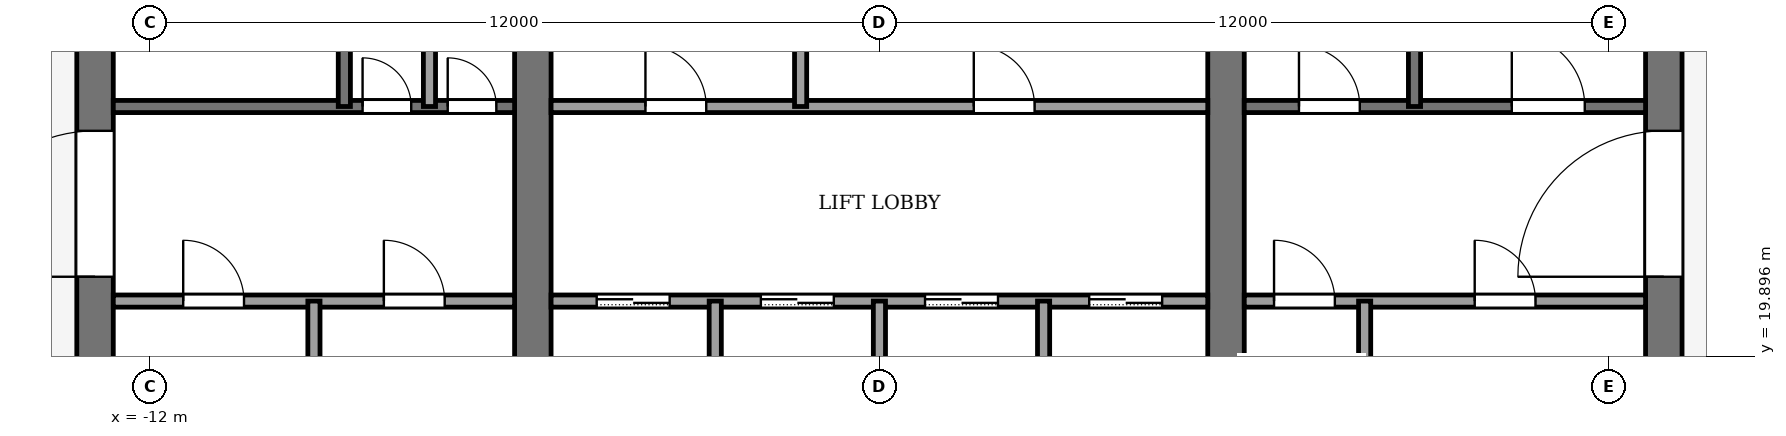
"""IFC4 building model, lengths in metres.
Left out: names, types, materials, properties, quantities, classifications, styles, units other than length and angle.
Written with IfcOpenShell. Run it as: python <this file> out.ifc"""

import sys

from ifc_helpers import new_model, si_unit, direction, frame, frame_2d, origin, place, context, subcontext, project, spatial, rectangle, extrude, element, fill, save


model = new_model("IFC4")
c1 = context("Model", 3, precision=1e-05, world=origin(), true_north=direction((0.0, 1.0)))
c2 = subcontext(c1, "Body", "Model", "MODEL_VIEW")
j1 = project(units=[si_unit("LENGTHUNIT", "METRE"), si_unit("PLANEANGLEUNIT", "RADIAN")], contexts=[c1])
p1 = place(None, origin())
s1 = spatial("IfcSite", under=j1, at=p1, CompositionType="ELEMENT")
p2 = place(p1, origin())
s2 = spatial("IfcBuilding", under=s1, at=p2, CompositionType="ELEMENT")
p3 = place(p2, frame((0.0, 0.0, 314.0)))
s3 = spatial("IfcBuildingStorey", under=s2, at=p3, CompositionType="ELEMENT", Elevation=314.0)
p4 = place(p3, frame((-12.9, 18.4, -0.13), z_axis=(0.0, 0.0, 1.0), x_axis=(0.0, 1.0, 0.0)))
e1 = element("IfcWall", 1, at=p4, inside=s3, PredefinedType="SHEAR", context=c2, shape_type="SweptSolid", body=[
    extrude(rectangle(XDim=19.2, YDim=0.6, at=frame_2d((9.6, 0.0))), origin(), (0.0, 0.0, 1.0), 4.0),
])
p5 = place(p4, frame((2.8, 0.0, 0.13)))
e2 = element("IfcOpeningElement", 2, at=p5, cuts=e1, PredefinedType="OPENING", context=c2, shape_type="SweptSolid", body=[
    extrude(rectangle(XDim=2.4, YDim=2.4, at=frame_2d((1.2, 1.2))), frame((0.0, 0.31, 0.0), z_axis=(0.0, -1.0, 0.0), x_axis=(1.0, 0.0, 0.0)), (0.0, 0.0, 1.0), 0.62),
])
p6 = place(p4, frame((13.4, 0.0, 0.13)))
e3 = element("IfcOpeningElement", 3, at=p6, cuts=e1, PredefinedType="OPENING", context=c2, shape_type="SweptSolid", body=[
    extrude(rectangle(XDim=1.4, YDim=2.2, at=frame_2d((0.7, 1.1))), frame((0.0, 0.31, 0.0), z_axis=(0.0, -1.0, 0.0), x_axis=(1.0, 0.0, 0.0)), (0.0, 0.0, 1.0), 0.62),
])
p7 = place(p3, frame((12.9, 18.4, -0.13), z_axis=(0.0, 0.0, 1.0), x_axis=(0.0, 1.0, 0.0)))
e4 = element("IfcWall", 4, at=p7, inside=s3, PredefinedType="SHEAR", context=c2, shape_type="SweptSolid", body=[
    extrude(rectangle(XDim=19.2, YDim=0.6, at=frame_2d((9.6, 0.0))), origin(), (0.0, 0.0, 1.0), 4.0),
])
p8 = place(p7, frame((2.8, 0.0, 0.13)))
e5 = element("IfcOpeningElement", 5, at=p8, cuts=e4, PredefinedType="OPENING", context=c2, shape_type="SweptSolid", body=[
    extrude(rectangle(XDim=2.4, YDim=2.4, at=frame_2d((1.2, 1.2))), frame((0.0, 0.31, 0.0), z_axis=(0.0, -1.0, 0.0), x_axis=(1.0, 0.0, 0.0)), (0.0, 0.0, 1.0), 0.62),
])
p9 = place(p7, frame((13.3, 0.0, 0.13)))
e6 = element("IfcOpeningElement", 6, at=p9, cuts=e4, PredefinedType="OPENING", context=c2, shape_type="SweptSolid", body=[
    extrude(rectangle(XDim=2.4, YDim=2.4, at=frame_2d((1.2, 1.2))), frame((0.0, 0.31, 0.0), z_axis=(0.0, -1.0, 0.0), x_axis=(1.0, 0.0, 0.0)), (0.0, 0.0, 1.0), 0.62),
])
p10 = place(p3, frame((-5.7, 18.4, -0.13), z_axis=(0.0, 0.0, 1.0), x_axis=(0.0, 1.0, 0.0)))
e7 = element("IfcWall", 7, at=p10, inside=s3, PredefinedType="SHEAR", context=c2, shape_type="SweptSolid", body=[
    extrude(rectangle(XDim=19.2, YDim=0.6, at=frame_2d((9.6, 0.0))), origin(), (0.0, 0.0, 1.0), 4.0),
])
p11 = place(p10, frame((8.35, 0.0, 0.13)))
e8 = element("IfcOpeningElement", 8, at=p11, cuts=e7, PredefinedType="OPENING", context=c2, shape_type="SweptSolid", body=[
    extrude(rectangle(XDim=0.9, YDim=2.1, at=frame_2d((0.45, 1.05))), frame((0.0, 0.31, 0.0), z_axis=(0.0, -1.0, 0.0), x_axis=(1.0, 0.0, 0.0)), (0.0, 0.0, 1.0), 0.62),
])
p12 = place(p3, frame((5.7, 18.4, -0.13), z_axis=(0.0, 0.0, 1.0), x_axis=(0.0, 1.0, 0.0)))
e9 = element("IfcWall", 9, at=p12, inside=s3, PredefinedType="SHEAR", context=c2, shape_type="SweptSolid", body=[
    extrude(rectangle(XDim=19.2, YDim=0.6, at=frame_2d((9.6, 0.0))), origin(), (0.0, 0.0, 1.0), 4.0),
])
p13 = place(p12, frame((8.35, 0.0, 0.13)))
e10 = element("IfcOpeningElement", 10, at=p13, cuts=e9, PredefinedType="OPENING", context=c2, shape_type="SweptSolid", body=[
    extrude(rectangle(XDim=0.9, YDim=2.1, at=frame_2d((0.45, 1.05))), frame((0.0, 0.31, 0.0), z_axis=(0.0, -1.0, 0.0), x_axis=(1.0, 0.0, 0.0)), (0.0, 0.0, 1.0), 0.62),
])
p14 = place(p12, frame((13.3, 0.0, 0.13)))
e11 = element("IfcOpeningElement", 11, at=p14, cuts=e9, PredefinedType="OPENING", context=c2, shape_type="SweptSolid", body=[
    extrude(rectangle(XDim=2.4, YDim=2.4, at=frame_2d((1.2, 1.2))), frame((0.0, 0.31, 0.0), z_axis=(0.0, -1.0, 0.0), x_axis=(1.0, 0.0, 0.0)), (0.0, 0.0, 1.0), 0.62),
])
p15 = place(p3, frame((-12.6, 20.8, 0.0), z_axis=(0.0, 0.0, 1.0), x_axis=(1.0, 0.0, 0.0)))
e12 = element("IfcWall", 12, at=p15, inside=s3, PredefinedType="PARTITIONING", context=c2, shape_type="SweptSolid", body=[
    extrude(rectangle(XDim=6.6, YDim=0.2, at=frame_2d((3.3, 0.0))), origin(), (0.0, 0.0, 1.0), 3.87),
])
p16 = place(p15, frame((1.15, 0.0, 0.0)))
e13 = element("IfcOpeningElement", 13, at=p16, cuts=e12, PredefinedType="OPENING", context=c2, shape_type="SweptSolid", body=[
    extrude(rectangle(XDim=1.0, YDim=2.1, at=frame_2d((0.5, 1.05))), frame((0.0, 0.11, 0.0), z_axis=(0.0, -1.0, 0.0), x_axis=(1.0, 0.0, 0.0)), (0.0, 0.0, 1.0), 0.22),
])
p17 = place(p15, frame((4.45, 0.0, 0.0)))
e14 = element("IfcOpeningElement", 14, at=p17, cuts=e12, PredefinedType="OPENING", context=c2, shape_type="SweptSolid", body=[
    extrude(rectangle(XDim=1.0, YDim=2.1, at=frame_2d((0.5, 1.05))), frame((0.0, 0.11, 0.0), z_axis=(0.0, -1.0, 0.0), x_axis=(1.0, 0.0, 0.0)), (0.0, 0.0, 1.0), 0.22),
])
p18 = place(p3, frame((-5.4, 20.8, 0.0), z_axis=(0.0, 0.0, 1.0), x_axis=(1.0, 0.0, 0.0)))
e15 = element("IfcWall", 15, at=p18, inside=s3, PredefinedType="PARTITIONING", context=c2, shape_type="SweptSolid", body=[
    extrude(rectangle(XDim=10.8, YDim=0.2, at=frame_2d((5.4, 0.0))), origin(), (0.0, 0.0, 1.0), 3.87),
])
p19 = place(p18, frame((0.75, 0.0, 0.0)))
e16 = element("IfcOpeningElement", 16, at=p19, cuts=e15, PredefinedType="OPENING", context=c2, shape_type="SweptSolid", body=[
    extrude(rectangle(XDim=1.2, YDim=2.2, at=frame_2d((0.6, 1.1))), frame((0.0, 0.11, 0.0), z_axis=(0.0, -1.0, 0.0), x_axis=(1.0, 0.0, 0.0)), (0.0, 0.0, 1.0), 0.22),
])
p20 = place(p18, frame((3.45, 0.0, 0.0)))
e17 = element("IfcOpeningElement", 17, at=p20, cuts=e15, PredefinedType="OPENING", context=c2, shape_type="SweptSolid", body=[
    extrude(rectangle(XDim=1.2, YDim=2.2, at=frame_2d((0.6, 1.1))), frame((0.0, 0.11, 0.0), z_axis=(0.0, -1.0, 0.0), x_axis=(1.0, 0.0, 0.0)), (0.0, 0.0, 1.0), 0.22),
])
p21 = place(p18, frame((6.15, 0.0, 0.0)))
e18 = element("IfcOpeningElement", 18, at=p21, cuts=e15, PredefinedType="OPENING", context=c2, shape_type="SweptSolid", body=[
    extrude(rectangle(XDim=1.2, YDim=2.2, at=frame_2d((0.6, 1.1))), frame((0.0, 0.11, 0.0), z_axis=(0.0, -1.0, 0.0), x_axis=(1.0, 0.0, 0.0)), (0.0, 0.0, 1.0), 0.22),
])
p22 = place(p18, frame((8.85, 0.0, 0.0)))
e19 = element("IfcOpeningElement", 19, at=p22, cuts=e15, PredefinedType="OPENING", context=c2, shape_type="SweptSolid", body=[
    extrude(rectangle(XDim=1.2, YDim=2.2, at=frame_2d((0.6, 1.1))), frame((0.0, 0.11, 0.0), z_axis=(0.0, -1.0, 0.0), x_axis=(1.0, 0.0, 0.0)), (0.0, 0.0, 1.0), 0.22),
])
p23 = place(p3, frame((6.0, 20.8, 0.0), z_axis=(0.0, 0.0, 1.0), x_axis=(1.0, 0.0, 0.0)))
e20 = element("IfcWall", 20, at=p23, inside=s3, PredefinedType="PARTITIONING", context=c2, shape_type="SweptSolid", body=[
    extrude(rectangle(XDim=6.6, YDim=0.2, at=frame_2d((3.3, 0.0))), origin(), (0.0, 0.0, 1.0), 3.87),
])
p24 = place(p23, frame((0.49, 0.0, 0.0)))
e21 = element("IfcOpeningElement", 21, at=p24, cuts=e20, PredefinedType="OPENING", context=c2, shape_type="SweptSolid", body=[
    extrude(rectangle(XDim=1.0, YDim=2.1, at=frame_2d((0.5, 1.05))), frame((0.0, 0.11, 0.0), z_axis=(0.0, -1.0, 0.0), x_axis=(1.0, 0.0, 0.0)), (0.0, 0.0, 1.0), 0.22),
])
p25 = place(p23, frame((3.79, 0.0, 0.0)))
e22 = element("IfcOpeningElement", 22, at=p25, cuts=e20, PredefinedType="OPENING", context=c2, shape_type="SweptSolid", body=[
    extrude(rectangle(XDim=1.0, YDim=2.1, at=frame_2d((0.5, 1.05))), frame((0.0, 0.11, 0.0), z_axis=(0.0, -1.0, 0.0), x_axis=(1.0, 0.0, 0.0)), (0.0, 0.0, 1.0), 0.22),
])
p26 = place(p3, frame((-12.6, 24.0, 0.0), z_axis=(0.0, 0.0, 1.0), x_axis=(1.0, 0.0, 0.0)))
e23 = element("IfcWall", 23, at=p26, inside=s3, PredefinedType="PARTITIONING", context=c2, shape_type="SweptSolid", body=[
    extrude(rectangle(XDim=6.6, YDim=0.2, at=frame_2d((3.3, 0.0))), origin(), (0.0, 0.0, 1.0), 3.87),
])
p27 = place(p26, frame((4.1, 0.0, 0.0)))
e24 = element("IfcOpeningElement", 24, at=p27, cuts=e23, PredefinedType="OPENING", context=c2, shape_type="SweptSolid", body=[
    extrude(rectangle(XDim=0.8, YDim=2.1, at=frame_2d((0.4, 1.05))), frame((0.0, 0.11, 0.0), z_axis=(0.0, -1.0, 0.0), x_axis=(1.0, 0.0, 0.0)), (0.0, 0.0, 1.0), 0.22),
])
p28 = place(p26, frame((5.5, 0.0, 0.0)))
e25 = element("IfcOpeningElement", 25, at=p28, cuts=e23, PredefinedType="OPENING", context=c2, shape_type="SweptSolid", body=[
    extrude(rectangle(XDim=0.8, YDim=2.1, at=frame_2d((0.4, 1.05))), frame((0.0, 0.11, 0.0), z_axis=(0.0, -1.0, 0.0), x_axis=(1.0, 0.0, 0.0)), (0.0, 0.0, 1.0), 0.22),
])
p29 = place(p3, frame((-5.4, 24.0, 0.0), z_axis=(0.0, 0.0, 1.0), x_axis=(1.0, 0.0, 0.0)))
e26 = element("IfcWall", 26, at=p29, inside=s3, PredefinedType="PARTITIONING", context=c2, shape_type="SweptSolid", body=[
    extrude(rectangle(XDim=10.8, YDim=0.2, at=frame_2d((5.4, 0.0))), origin(), (0.0, 0.0, 1.0), 3.87),
])
p30 = place(p29, frame((1.552, 0.0, 0.0)))
e27 = element("IfcOpeningElement", 27, at=p30, cuts=e26, PredefinedType="OPENING", context=c2, shape_type="SweptSolid", body=[
    extrude(rectangle(XDim=1.0, YDim=2.1, at=frame_2d((0.5, 1.05))), frame((0.0, 0.11, 0.0), z_axis=(0.0, -1.0, 0.0), x_axis=(1.0, 0.0, 0.0)), (0.0, 0.0, 1.0), 0.22),
])
p31 = place(p29, frame((6.952, 0.0, 0.0)))
e28 = element("IfcOpeningElement", 28, at=p31, cuts=e26, PredefinedType="OPENING", context=c2, shape_type="SweptSolid", body=[
    extrude(rectangle(XDim=1.0, YDim=2.1, at=frame_2d((0.5, 1.05))), frame((0.0, 0.11, 0.0), z_axis=(0.0, -1.0, 0.0), x_axis=(1.0, 0.0, 0.0)), (0.0, 0.0, 1.0), 0.22),
])
p32 = place(p3, frame((6.0, 24.0, 0.0), z_axis=(0.0, 0.0, 1.0), x_axis=(1.0, 0.0, 0.0)))
e29 = element("IfcWall", 29, at=p32, inside=s3, PredefinedType="PARTITIONING", context=c2, shape_type="SweptSolid", body=[
    extrude(rectangle(XDim=6.6, YDim=0.2, at=frame_2d((3.3, 0.0))), origin(), (0.0, 0.0, 1.0), 3.87),
])
p33 = place(p32, frame((0.9, 0.0, 0.0)))
e30 = element("IfcOpeningElement", 30, at=p33, cuts=e29, PredefinedType="OPENING", context=c2, shape_type="SweptSolid", body=[
    extrude(rectangle(XDim=1.0, YDim=2.1, at=frame_2d((0.5, 1.05))), frame((0.0, 0.11, 0.0), z_axis=(0.0, -1.0, 0.0), x_axis=(1.0, 0.0, 0.0)), (0.0, 0.0, 1.0), 0.22),
])
p34 = place(p32, frame((4.4, 0.0, 0.0)))
e31 = element("IfcOpeningElement", 31, at=p34, cuts=e29, PredefinedType="OPENING", context=c2, shape_type="SweptSolid", body=[
    extrude(rectangle(XDim=1.2, YDim=2.2, at=frame_2d((0.6, 1.1))), frame((0.0, 0.11, 0.0), z_axis=(0.0, -1.0, 0.0), x_axis=(1.0, 0.0, 0.0)), (0.0, 0.0, 1.0), 0.22),
])
p35 = place(p3, frame((-9.3, 18.4, 0.0), z_axis=(0.0, 0.0, 1.0), x_axis=(0.0, 1.0, 0.0)))
e32 = element("IfcWall", 32, at=p35, inside=s3, PredefinedType="PARTITIONING", context=c2, shape_type="SweptSolid", body=[
    extrude(rectangle(XDim=2.4, YDim=0.2, at=frame_2d((1.2, 0.0))), origin(), (0.0, 0.0, 1.0), 3.87),
])
for number, where, z_axis, x_axis in (
    (33, (-8.8, 24.0, 0.0), (0.0, 0.0, 1.0), (0.0, 1.0, 0.0)),
    (34, (-7.4, 24.0, 0.0), (0.0, 0.0, 1.0), (0.0, 1.0, 0.0)),
):
    element("IfcWall", number, at=place(p3, frame(where, z_axis=z_axis, x_axis=x_axis)), inside=s3, PredefinedType="PARTITIONING", context=c2, shape_type="SweptSolid", body=[
        extrude(rectangle(XDim=7.4, YDim=0.2, at=frame_2d((3.7, 0.0))), origin(), (0.0, 0.0, 1.0), 3.87),
    ])
p36 = place(p3, frame((-2.7, 18.4, 0.0), z_axis=(0.0, 0.0, 1.0), x_axis=(0.0, 1.0, 0.0)))
e35 = element("IfcWall", 35, at=p36, inside=s3, PredefinedType="PARTITIONING", context=c2, shape_type="SweptSolid", body=[
    extrude(rectangle(XDim=2.4, YDim=0.2, at=frame_2d((1.2, 0.0))), origin(), (0.0, 0.0, 1.0), 3.87),
])
p37 = place(p3, frame((-1.296, 24.0, 0.0), z_axis=(0.0, 0.0, 1.0), x_axis=(0.0, 1.0, 0.0)))
e36 = element("IfcWall", 36, at=p37, inside=s3, PredefinedType="PARTITIONING", context=c2, shape_type="SweptSolid", body=[
    extrude(rectangle(XDim=2.4, YDim=0.2, at=frame_2d((1.2, 0.0))), origin(), (0.0, 0.0, 1.0), 3.87),
])
for number, where, z_axis, x_axis in (
    (37, (0.0, 18.4, 0.0), (0.0, 0.0, 1.0), (0.0, 1.0, 0.0)),
    (38, (2.7, 18.4, 0.0), (0.0, 0.0, 1.0), (0.0, 1.0, 0.0)),
    (39, (7.98, 18.4, 0.0), (0.0, 0.0, 1.0), (0.0, 1.0, 0.0)),
):
    element("IfcWall", number, at=place(p3, frame(where, z_axis=z_axis, x_axis=x_axis)), inside=s3, PredefinedType="PARTITIONING", context=c2, shape_type="SweptSolid", body=[
        extrude(rectangle(XDim=2.4, YDim=0.2, at=frame_2d((1.2, 0.0))), origin(), (0.0, 0.0, 1.0), 3.87),
    ])
p38 = place(p3, frame((8.8, 24.0, 0.0), z_axis=(0.0, 0.0, 1.0), x_axis=(0.0, 1.0, 0.0)))
e40 = element("IfcWall", 40, at=p38, inside=s3, PredefinedType="PARTITIONING", context=c2, shape_type="SweptSolid", body=[
    extrude(rectangle(XDim=7.4, YDim=0.2, at=frame_2d((3.7, 0.0))), origin(), (0.0, 0.0, 1.0), 3.87),
])
p39 = place(p19, origin())
e41 = element("IfcDoor", 41, at=p39, inside=s3, OperationType="SLIDING_TO_LEFT", PredefinedType="DOOR", context=c2, shape_type="SweptSolid", body=[
    extrude(rectangle(XDim=1.2, YDim=2.2, at=frame_2d((0.6, 1.1))), frame((0.0, 0.025, 0.0), z_axis=(0.0, -1.0, 0.0), x_axis=(1.0, 0.0, 0.0)), (0.0, 0.0, 1.0), 0.05),
])
fill(e16, e41)
p40 = place(p20, origin())
e42 = element("IfcDoor", 42, at=p40, inside=s3, OperationType="SLIDING_TO_LEFT", PredefinedType="DOOR", context=c2, shape_type="SweptSolid", body=[
    extrude(rectangle(XDim=1.2, YDim=2.2, at=frame_2d((0.6, 1.1))), frame((0.0, 0.025, 0.0), z_axis=(0.0, -1.0, 0.0), x_axis=(1.0, 0.0, 0.0)), (0.0, 0.0, 1.0), 0.05),
])
fill(e17, e42)
p41 = place(p21, origin())
e43 = element("IfcDoor", 43, at=p41, inside=s3, OperationType="SLIDING_TO_LEFT", PredefinedType="DOOR", context=c2, shape_type="SweptSolid", body=[
    extrude(rectangle(XDim=1.2, YDim=2.2, at=frame_2d((0.6, 1.1))), frame((0.0, 0.025, 0.0), z_axis=(0.0, -1.0, 0.0), x_axis=(1.0, 0.0, 0.0)), (0.0, 0.0, 1.0), 0.05),
])
fill(e18, e43)
p42 = place(p22, origin())
e44 = element("IfcDoor", 44, at=p42, inside=s3, OperationType="SLIDING_TO_LEFT", PredefinedType="DOOR", context=c2, shape_type="SweptSolid", body=[
    extrude(rectangle(XDim=1.2, YDim=2.2, at=frame_2d((0.6, 1.1))), frame((0.0, 0.025, 0.0), z_axis=(0.0, -1.0, 0.0), x_axis=(1.0, 0.0, 0.0)), (0.0, 0.0, 1.0), 0.05),
])
fill(e19, e44)
p43 = place(p30, origin())
e45 = element("IfcDoor", 45, at=p43, inside=s3, OperationType="SINGLE_SWING_LEFT", PredefinedType="DOOR", context=c2, shape_type="SweptSolid", body=[
    extrude(rectangle(XDim=1.0, YDim=2.1, at=frame_2d((0.5, 1.05))), frame((0.0, 0.025, 0.0), z_axis=(0.0, -1.0, 0.0), x_axis=(1.0, 0.0, 0.0)), (0.0, 0.0, 1.0), 0.05),
])
fill(e27, e45)
p44 = place(p31, origin())
e46 = element("IfcDoor", 46, at=p44, inside=s3, OperationType="SINGLE_SWING_RIGHT", PredefinedType="DOOR", context=c2, shape_type="SweptSolid", body=[
    extrude(rectangle(XDim=1.0, YDim=2.1, at=frame_2d((0.5, 1.05))), frame((0.0, 0.025, 0.0), z_axis=(0.0, -1.0, 0.0), x_axis=(1.0, 0.0, 0.0)), (0.0, 0.0, 1.0), 0.05),
])
fill(e28, e46)
p45 = place(p16, origin())
e47 = element("IfcDoor", 47, at=p45, inside=s3, OperationType="SINGLE_SWING_LEFT", PredefinedType="DOOR", context=c2, shape_type="SweptSolid", body=[
    extrude(rectangle(XDim=1.0, YDim=2.1, at=frame_2d((0.5, 1.05))), frame((0.0, 0.025, 0.0), z_axis=(0.0, -1.0, 0.0), x_axis=(1.0, 0.0, 0.0)), (0.0, 0.0, 1.0), 0.05),
])
fill(e13, e47)
p46 = place(p17, origin())
e48 = element("IfcDoor", 48, at=p46, inside=s3, OperationType="SINGLE_SWING_LEFT", PredefinedType="DOOR", context=c2, shape_type="SweptSolid", body=[
    extrude(rectangle(XDim=1.0, YDim=2.1, at=frame_2d((0.5, 1.05))), frame((0.0, 0.025, 0.0), z_axis=(0.0, -1.0, 0.0), x_axis=(1.0, 0.0, 0.0)), (0.0, 0.0, 1.0), 0.05),
])
fill(e14, e48)
p47 = place(p24, origin())
e49 = element("IfcDoor", 49, at=p47, inside=s3, OperationType="SINGLE_SWING_RIGHT", PredefinedType="DOOR", context=c2, shape_type="SweptSolid", body=[
    extrude(rectangle(XDim=1.0, YDim=2.1, at=frame_2d((0.5, 1.05))), frame((0.0, 0.025, 0.0), z_axis=(0.0, -1.0, 0.0), x_axis=(1.0, 0.0, 0.0)), (0.0, 0.0, 1.0), 0.05),
])
fill(e21, e49)
p48 = place(p25, origin())
e50 = element("IfcDoor", 50, at=p48, inside=s3, OperationType="SINGLE_SWING_RIGHT", PredefinedType="DOOR", context=c2, shape_type="SweptSolid", body=[
    extrude(rectangle(XDim=1.0, YDim=2.1, at=frame_2d((0.5, 1.05))), frame((0.0, 0.025, 0.0), z_axis=(0.0, -1.0, 0.0), x_axis=(1.0, 0.0, 0.0)), (0.0, 0.0, 1.0), 0.05),
])
fill(e22, e50)
p49 = place(p27, origin())
e51 = element("IfcDoor", 51, at=p49, inside=s3, OperationType="SINGLE_SWING_LEFT", PredefinedType="DOOR", context=c2, shape_type="SweptSolid", body=[
    extrude(rectangle(XDim=0.8, YDim=2.1, at=frame_2d((0.4, 1.05))), frame((0.0, 0.025, 0.0), z_axis=(0.0, -1.0, 0.0), x_axis=(1.0, 0.0, 0.0)), (0.0, 0.0, 1.0), 0.05),
])
fill(e24, e51)
p50 = place(p28, origin())
e52 = element("IfcDoor", 52, at=p50, inside=s3, OperationType="SINGLE_SWING_RIGHT", PredefinedType="DOOR", context=c2, shape_type="SweptSolid", body=[
    extrude(rectangle(XDim=0.8, YDim=2.1, at=frame_2d((0.4, 1.05))), frame((0.0, 0.025, 0.0), z_axis=(0.0, -1.0, 0.0), x_axis=(1.0, 0.0, 0.0)), (0.0, 0.0, 1.0), 0.05),
])
fill(e25, e52)
p51 = place(p33, origin())
e53 = element("IfcDoor", 53, at=p51, inside=s3, OperationType="SINGLE_SWING_RIGHT", PredefinedType="DOOR", context=c2, shape_type="SweptSolid", body=[
    extrude(rectangle(XDim=1.0, YDim=2.1, at=frame_2d((0.5, 1.05))), frame((0.0, 0.025, 0.0), z_axis=(0.0, -1.0, 0.0), x_axis=(1.0, 0.0, 0.0)), (0.0, 0.0, 1.0), 0.05),
])
fill(e30, e53)
p52 = place(p34, origin())
e54 = element("IfcDoor", 54, at=p52, inside=s3, OperationType="SINGLE_SWING_LEFT", PredefinedType="DOOR", context=c2, shape_type="SweptSolid", body=[
    extrude(rectangle(XDim=1.2, YDim=2.2, at=frame_2d((0.6, 1.1))), frame((0.0, 0.025, 0.0), z_axis=(0.0, -1.0, 0.0), x_axis=(1.0, 0.0, 0.0)), (0.0, 0.0, 1.0), 0.05),
])
fill(e31, e54)
p53 = place(p5, origin())
e55 = element("IfcDoor", 55, at=p53, inside=s3, OperationType="DOUBLE_DOOR_SINGLE_SWING", PredefinedType="DOOR", context=c2, shape_type="SweptSolid", body=[
    extrude(rectangle(XDim=2.4, YDim=2.4, at=frame_2d((1.2, 1.2))), frame((0.0, 0.025, 0.0), z_axis=(0.0, -1.0, 0.0), x_axis=(1.0, 0.0, 0.0)), (0.0, 0.0, 1.0), 0.05),
])
fill(e2, e55)
p54 = place(p8, origin())
e56 = element("IfcDoor", 56, at=p54, inside=s3, OperationType="DOUBLE_DOOR_SINGLE_SWING", PredefinedType="DOOR", context=c2, shape_type="SweptSolid", body=[
    extrude(rectangle(XDim=2.4, YDim=2.4, at=frame_2d((1.2, 1.2))), frame((0.0, 0.025, 0.0), z_axis=(0.0, -1.0, 0.0), x_axis=(1.0, 0.0, 0.0)), (0.0, 0.0, 1.0), 0.05),
])
fill(e5, e56)
save(model, sys.argv[1])
